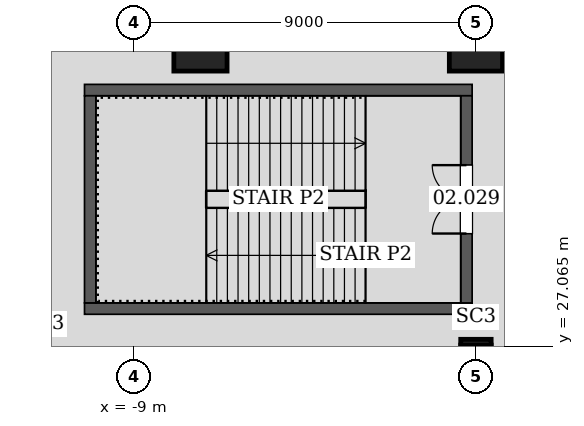
"""IFC4 building model, lengths in metres.
Left out: names, types, materials, properties, quantities, classifications, styles, units other than length and angle.
Written with IfcOpenShell. Run it as: python <this file> out.ifc"""

import sys

from ifc_helpers import new_model, si_unit, direction, frame, frame_2d, origin, origin_2d, place, context, subcontext, project, spatial, rectangle, hollow_rectangle, extrude, element, fill, save


model = new_model("IFC4")
c1 = context("Model", 3, precision=1e-05, world=origin(), true_north=direction((0.0, 1.0)))
c2 = subcontext(c1, "Body", "Model", "MODEL_VIEW")
j1 = project(units=[si_unit("LENGTHUNIT", "METRE"), si_unit("PLANEANGLEUNIT", "RADIAN")], contexts=[c1])
p1 = place(None, origin())
s1 = spatial("IfcSite", under=j1, at=p1, CompositionType="ELEMENT")
p2 = place(p1, origin())
s2 = spatial("IfcBuilding", under=s1, at=p2, CompositionType="ELEMENT")
p3 = place(p2, frame((0.0, 0.0, 13.2)))
s3 = spatial("IfcBuildingStorey", under=s2, at=p3, CompositionType="ELEMENT", Elevation=13.2)
p4 = place(p3, frame((-10.754, 25.963, 0.0), z_axis=(0.011703901791, -0.028288195063, 0.999531288506), x_axis=(0.92403481427, 0.3823083337, 0.0)))
e1 = element("IfcColumn", 1, at=p4, inside=s3, PredefinedType="COLUMN", context=c2, shape_type="SweptSolid", body=[
    extrude(hollow_rectangle(XDim=2.0, YDim=2.0, WallThickness=0.09, at=origin_2d()), origin(), (0.0, 0.0, 1.0), 5.403),
])
p5 = place(p3, frame((0.0, 26.841, 0.0), z_axis=(0.0, -0.028290132739, 0.999599754096), x_axis=(1.0, 0.0, 0.0)))
e2 = element("IfcColumn", 2, at=p5, inside=s3, PredefinedType="COLUMN", context=c2, shape_type="SweptSolid", body=[
    extrude(hollow_rectangle(XDim=0.8, YDim=0.8, WallThickness=0.05, at=origin_2d()), origin(), (0.0, 0.0, 1.0), 5.402),
])
for number, where, z_axis, x_axis in (
    (3, (0.0, 35.0, 0.0), (0.0, 0.0, 1.0), (1.0, 0.0, 0.0)),
    (4, (-7.249, 35.0, 0.0), (0.0, 0.0, 1.0), (1.0, 0.0, 0.0)),
):
    element("IfcColumn", number, at=place(p3, frame(where, z_axis=z_axis, x_axis=x_axis)), inside=s3, PredefinedType="COLUMN", context=c2, shape_type="SweptSolid", body=[
        extrude(rectangle(XDim=1.4, YDim=1.4, at=origin_2d()), origin(), (0.0, 0.0, 1.0), 5.4),
    ])
for number, where, z_axis, x_axis in (
    (5, (-10.3, 28.05, 0.0), (0.0, 0.0, 1.0), (1.0, 0.0, 0.0)),
    (6, (-0.1, 33.8, 0.0), (0.0, 0.0, 1.0), (-1.0, 0.0, 0.0)),
):
    element("IfcWall", number, at=place(p3, frame(where, z_axis=z_axis, x_axis=x_axis)), inside=s3, PredefinedType="SOLIDWALL", context=c2, shape_type="SweptSolid", body=[
        extrude(rectangle(XDim=10.2, YDim=0.3, at=frame_2d((5.1, 0.0))), origin(), (0.0, 0.0, 1.0), 5.4),
    ])
p6 = place(p3, frame((-10.15, 33.65, 0.0), z_axis=(0.0, 0.0, 1.0), x_axis=(0.0, -1.0, 0.0)))
e7 = element("IfcWall", 7, at=p6, inside=s3, PredefinedType="SOLIDWALL", context=c2, shape_type="SweptSolid", body=[
    extrude(rectangle(XDim=5.45, YDim=0.3, at=frame_2d((2.725, 0.0))), origin(), (0.0, 0.0, 1.0), 5.4),
])
p7 = place(p3, frame((-0.25, 28.2, 0.0), z_axis=(0.0, 0.0, 1.0), x_axis=(0.0, 1.0, 0.0)))
e8 = element("IfcWall", 8, at=p7, inside=s3, PredefinedType="SOLIDWALL", context=c2, shape_type="SweptSolid", body=[
    extrude(rectangle(XDim=5.45, YDim=0.3, at=frame_2d((2.725, 0.0))), origin(), (0.0, 0.0, 1.0), 5.4),
])
p8 = place(p7, frame((1.825, 0.0, 0.0)))
e9 = element("IfcOpeningElement", 9, at=p8, cuts=e8, PredefinedType="OPENING", context=c2, shape_type="SweptSolid", body=[
    extrude(rectangle(XDim=1.8, YDim=2.1, at=frame_2d((0.9, 1.05))), frame((0.0, 0.16, 0.0), z_axis=(0.0, -1.0, 0.0), x_axis=(1.0, 0.0, 0.0)), (0.0, 0.0, 1.0), 0.32),
])
p9 = place(p8, origin())
e10 = element("IfcDoor", 10, at=p9, inside=s3, OperationType="DOUBLE_DOOR_SINGLE_SWING", PredefinedType="DOOR", context=c2, shape_type="SweptSolid", body=[
    extrude(rectangle(XDim=1.8, YDim=2.1, at=frame_2d((0.9, 1.05))), frame((0.0, 0.025, 0.0), z_axis=(0.0, -1.0, 0.0), x_axis=(1.0, 0.0, 0.0)), (0.0, 0.0, 1.0), 0.05),
])
fill(e9, e10)
save(model, sys.argv[1])
